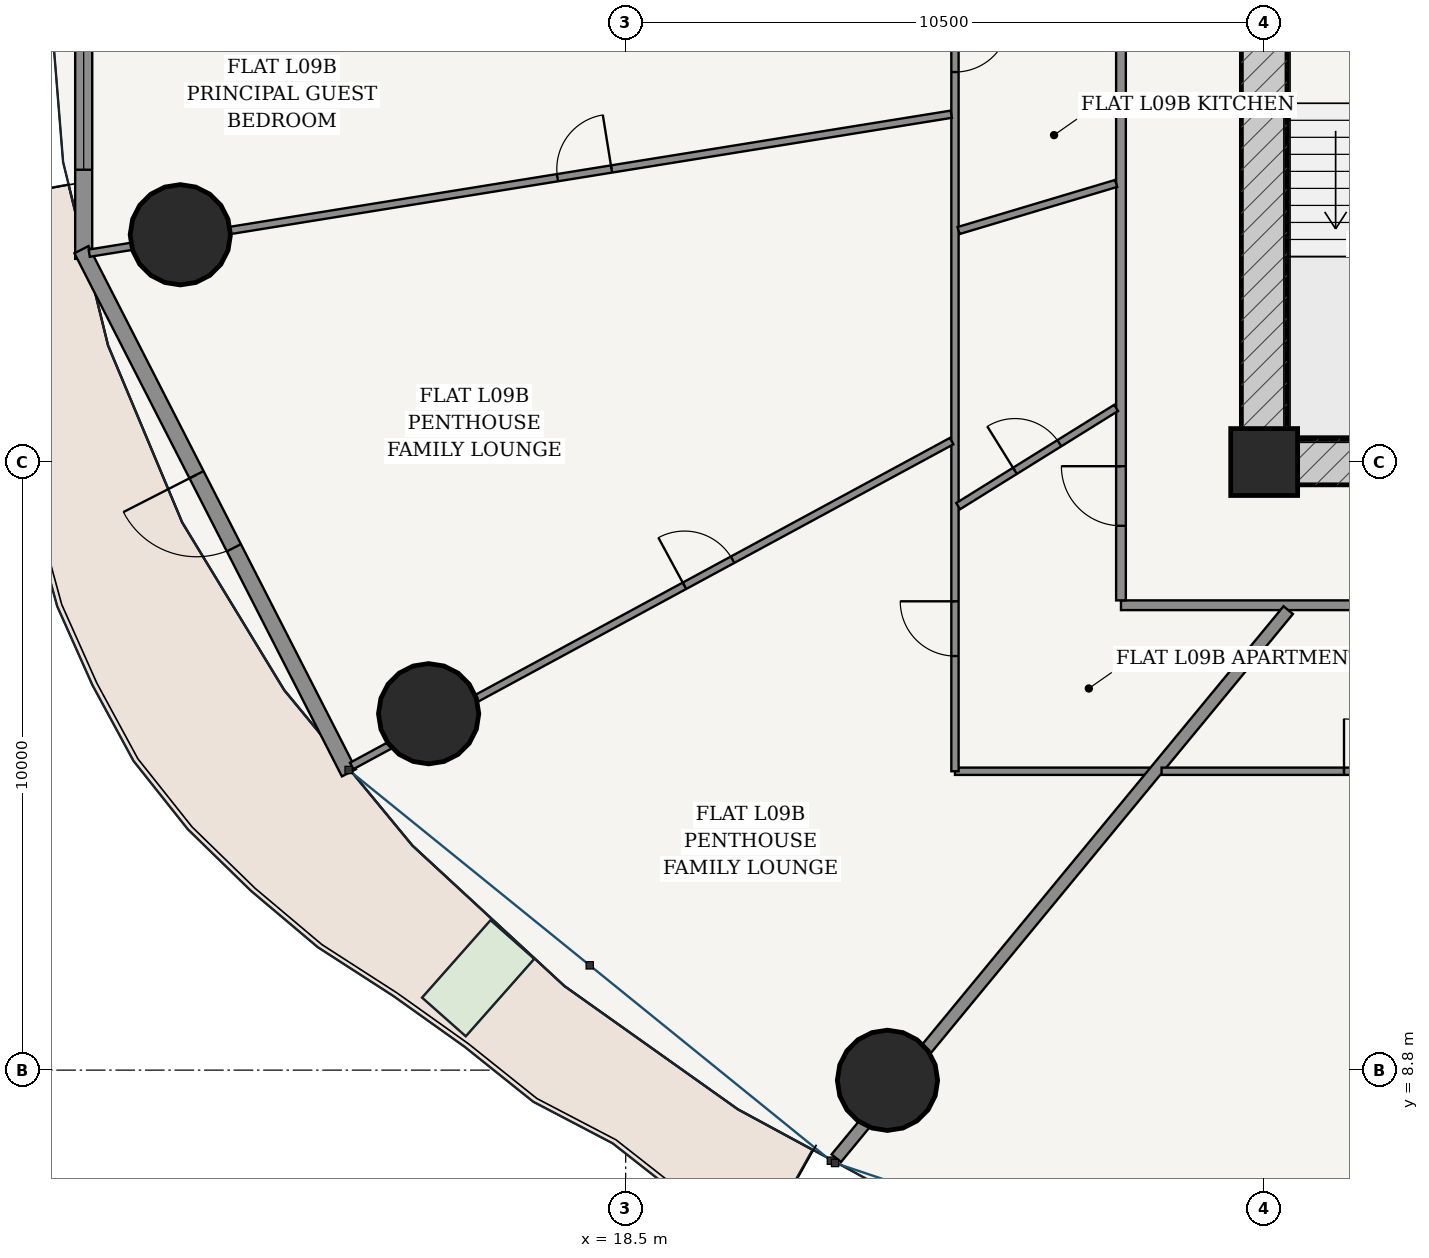
"""IFC4 building model, lengths in metres.
Left out: names, types, materials, properties, quantities, classifications, styles, units other than length and angle.
Written with IfcOpenShell. Run it as: python <this file> out.ifc"""

import sys

from ifc_helpers import new_model, si_unit, direction, frame, frame_2d, origin, origin_2d, place, context, subcontext, project, spatial, rectangle, hollow_circle, extrude, source, transform, mapped, element, fill, save


model = new_model("IFC4")
c1 = context("Model", 3, precision=1e-05, world=origin(), true_north=direction((-0.2419218956, 0.970295726276)))
c2 = subcontext(c1, "Body", "Model", "MODEL_VIEW")
j1 = project(units=[si_unit("LENGTHUNIT", "METRE"), si_unit("PLANEANGLEUNIT", "RADIAN")], contexts=[c1])
p1 = place(None, origin())
s1 = spatial("IfcSite", under=j1, at=p1, CompositionType="ELEMENT")
p2 = place(p1, origin())
s2 = spatial("IfcBuilding", under=s1, at=p2, CompositionType="ELEMENT")
p3 = place(p2, frame((0.0, 0.0, 38.4)))
s3 = spatial("IfcBuildingStorey", under=s2, at=p3, CompositionType="ELEMENT", Elevation=38.4)
p4 = place(p3, frame((29.0, 18.8, 0.0), z_axis=(0.0, 0.0, 1.0), x_axis=(1.0, 0.0, 0.0)))
e1 = element("IfcColumn", 1, at=p4, inside=s3, PredefinedType="COLUMN", context=c2, shape_type="SweptSolid", body=[
    extrude(rectangle(XDim=1.1, YDim=1.1, at=origin_2d()), origin(), (0.0, 0.0, 1.0), 3.6),
])
p5 = place(p3, frame((28.625, 18.8, 0.0), z_axis=(0.0, 0.0, 1.0), x_axis=(1.0, 0.0, 0.0)))
e2 = element("IfcWall", 2, at=p5, inside=s3, PredefinedType="SHEAR", context=c2, shape_type="SweptSolid", body=[
    extrude(rectangle(XDim=18.75, YDim=0.75, at=frame_2d((9.375, 0.0))), origin(), (0.0, 0.0, 1.0), 3.32),
])
p6 = place(p5, frame((6.927, 0.0, 0.0)))
e3 = element("IfcOpeningElement", 3, at=p6, cuts=e2, PredefinedType="OPENING", context=c2, shape_type="SweptSolid", body=[
    extrude(rectangle(XDim=0.85, YDim=2.1, at=frame_2d((0.425, 1.05))), frame((0.0, 0.385, 0.0), z_axis=(0.0, -1.0, 0.0), x_axis=(1.0, 0.0, 0.0)), (0.0, 0.0, 1.0), 0.77),
])
p7 = place(p5, frame((8.95, 0.0, 0.0)))
e4 = element("IfcOpeningElement", 4, at=p7, cuts=e2, PredefinedType="OPENING", context=c2, shape_type="SweptSolid", body=[
    extrude(rectangle(XDim=0.85, YDim=2.1, at=frame_2d((0.425, 1.05))), frame((0.0, 0.385, 0.0), z_axis=(0.0, -1.0, 0.0), x_axis=(1.0, 0.0, 0.0)), (0.0, 0.0, 1.0), 0.77),
])
p8 = place(p5, frame((10.972, 0.0, 0.0)))
e5 = element("IfcOpeningElement", 5, at=p8, cuts=e2, PredefinedType="OPENING", context=c2, shape_type="SweptSolid", body=[
    extrude(rectangle(XDim=0.85, YDim=2.1, at=frame_2d((0.425, 1.05))), frame((0.0, 0.385, 0.0), z_axis=(0.0, -1.0, 0.0), x_axis=(1.0, 0.0, 0.0)), (0.0, 0.0, 1.0), 0.77),
])
p9 = place(p3, frame((29.0, 19.175, 0.0), z_axis=(0.0, 0.0, 1.0), x_axis=(0.0, 1.0, 0.0)))
e6 = element("IfcWall", 6, at=p9, inside=s3, PredefinedType="SHEAR", context=c2, shape_type="SweptSolid", body=[
    extrude(rectangle(XDim=15.25, YDim=0.75, at=frame_2d((7.625, 0.0))), origin(), (0.0, 0.0, 1.0), 3.32),
])
p10 = place(p9, frame((9.875, 0.0, 0.0)))
e7 = element("IfcOpeningElement", 7, at=p10, cuts=e6, PredefinedType="OPENING", context=c2, shape_type="SweptSolid", body=[
    extrude(rectangle(XDim=1.5, YDim=2.2, at=frame_2d((0.75, 1.1))), frame((0.0, 0.385, 0.0), z_axis=(0.0, -1.0, 0.0), x_axis=(1.0, 0.0, 0.0)), (0.0, 0.0, 1.0), 0.77),
])
for number, where, z_axis, x_axis in (
    (8, (11.176, 22.537, 0.0), (0.0, 0.0, 1.0), (1.0, 0.0, 0.0)),
    (9, (15.259, 14.661, 0.0), (0.0, 0.0, 1.0), (1.0, 0.0, 0.0)),
    (10, (22.805, 8.632, 0.0), (0.0, 0.0, 1.0), (1.0, 0.0, 0.0)),
):
    element("IfcColumn", number, at=place(p3, frame(where, z_axis=z_axis, x_axis=x_axis)), inside=s3, PredefinedType="COLUMN", context=c2, shape_type="SweptSolid", body=[
        extrude(hollow_circle(Radius=0.825, WallThickness=0.05, at=origin_2d()), origin(), (0.0, 0.0, 1.0), 3.6),
    ])
p11 = place(p3, frame((9.587, 31.459, 0.0), z_axis=(0.0, 0.0, 1.0), x_axis=(0.0, -1.0, 0.0)))
e11 = element("IfcWall", 11, at=p11, inside=s3, PredefinedType="SOLIDWALL", context=c2, shape_type="SweptSolid", body=[
    extrude(rectangle(XDim=9.318, YDim=0.28, at=frame_2d((4.659, 0.0))), origin(), (0.0, 0.0, 1.0), 3.32),
])
p12 = place(p11, frame((1.466, 0.0, 0.85)))
e12 = element("IfcOpeningElement", 12, at=p12, cuts=e11, PredefinedType="OPENING", context=c2, shape_type="SweptSolid", body=[
    extrude(rectangle(XDim=2.1, YDim=1.95, at=frame_2d((1.05, 0.975))), frame((0.0, 0.15, 0.0), z_axis=(0.0, -1.0, 0.0), x_axis=(1.0, 0.0, 0.0)), (0.0, 0.0, 1.0), 0.3),
])
p13 = place(p11, frame((5.752, 0.0, 0.85)))
e13 = element("IfcOpeningElement", 13, at=p13, cuts=e11, PredefinedType="OPENING", context=c2, shape_type="SweptSolid", body=[
    extrude(rectangle(XDim=2.1, YDim=1.95, at=frame_2d((1.05, 0.975))), frame((0.0, 0.15, 0.0), z_axis=(0.0, -1.0, 0.0), x_axis=(1.0, 0.0, 0.0)), (0.0, 0.0, 1.0), 0.3),
])
p14 = place(p3, frame((9.55, 22.292, 0.0), z_axis=(0.0, 0.0, 1.0), x_axis=(0.455220575541, -0.890378698984, 0.0)))
e14 = element("IfcWall", 14, at=p14, inside=s3, PredefinedType="SOLIDWALL", context=c2, shape_type="SweptSolid", body=[
    extrude(rectangle(XDim=9.662, YDim=0.26, at=frame_2d((4.831, 0.0))), origin(), (0.0, 0.0, 1.0), 3.32),
])
p15 = place(p14, frame((4.156, 0.0, 0.0)))
e15 = element("IfcOpeningElement", 15, at=p15, cuts=e14, PredefinedType="OPENING", context=c2, shape_type="SweptSolid", body=[
    extrude(rectangle(XDim=1.35, YDim=2.2, at=frame_2d((0.675, 1.1))), frame((0.0, 0.14, 0.0), z_axis=(0.0, -1.0, 0.0), x_axis=(1.0, 0.0, 0.0)), (0.0, 0.0, 1.0), 0.28),
])
p16 = place(p3, frame((26.645, 16.445, 0.0), z_axis=(0.0, 0.0, 1.0), x_axis=(1.0, 0.0, 0.0)))
e16 = element("IfcWall", 16, at=p16, inside=s3, PredefinedType="PARTITIONING", context=c2, shape_type="SweptSolid", body=[
    extrude(rectangle(XDim=22.71, YDim=0.16, at=frame_2d((11.355, 0.0))), origin(), (0.0, 0.0, 1.0), 2.688),
])
p17 = place(p3, frame((26.645, 16.525, 0.0), z_axis=(0.0, 0.0, 1.0), x_axis=(0.0, 1.0, 0.0)))
e17 = element("IfcWall", 17, at=p17, inside=s3, PredefinedType="PARTITIONING", context=c2, shape_type="SweptSolid", body=[
    extrude(rectangle(XDim=20.55, YDim=0.16, at=frame_2d((10.275, 0.0))), origin(), (0.0, 0.0, 1.0), 2.688),
])
p18 = place(p17, frame((1.226, 0.0, 0.0)))
e18 = element("IfcOpeningElement", 18, at=p18, cuts=e17, PredefinedType="OPENING", context=c2, shape_type="SweptSolid", body=[
    extrude(rectangle(XDim=0.98, YDim=2.2, at=frame_2d((0.49, 1.1))), frame((0.0, 0.09, 0.0), z_axis=(0.0, -1.0, 0.0), x_axis=(1.0, 0.0, 0.0)), (0.0, 0.0, 1.0), 0.18),
])
p19 = place(p3, frame((27.109, 13.715, 0.0), z_axis=(0.0, 0.0, 1.0), x_axis=(-1.0, 0.0, 0.0)))
e19 = element("IfcWall", 19, at=p19, inside=s3, PredefinedType="PARTITIONING", context=c2, shape_type="SweptSolid", body=[
    extrude(rectangle(XDim=3.194, YDim=0.12, at=frame_2d((1.597, 0.0))), origin(), (0.0, 0.0, 1.0), 2.688),
])
p20 = place(p3, frame((23.915, 13.715, 0.0), z_axis=(0.0, 0.0, 1.0), x_axis=(0.0, 1.0, 0.0)))
e20 = element("IfcWall", 20, at=p20, inside=s3, PredefinedType="PARTITIONING", context=c2, shape_type="SweptSolid", body=[
    extrude(rectangle(XDim=26.17, YDim=0.12, at=frame_2d((13.085, 0.0))), origin(), (0.0, 0.0, 1.0), 2.688),
])
p21 = place(p20, frame((1.895, 0.0, 0.0)))
e21 = element("IfcOpeningElement", 21, at=p21, cuts=e20, PredefinedType="OPENING", context=c2, shape_type="SweptSolid", body=[
    extrude(rectangle(XDim=0.9, YDim=2.15, at=frame_2d((0.45, 1.075))), frame((0.0, 0.07, 0.0), z_axis=(0.0, -1.0, 0.0), x_axis=(1.0, 0.0, 0.0)), (0.0, 0.0, 1.0), 0.14),
])
p22 = place(p20, frame((11.498, 0.0, 0.0)))
e22 = element("IfcOpeningElement", 22, at=p22, cuts=e20, PredefinedType="OPENING", context=c2, shape_type="SweptSolid", body=[
    extrude(rectangle(XDim=0.9, YDim=2.15, at=frame_2d((0.45, 1.075))), frame((0.0, 0.07, 0.0), z_axis=(0.0, -1.0, 0.0), x_axis=(1.0, 0.0, 0.0)), (0.0, 0.0, 1.0), 0.14),
])
p23 = place(p20, frame((23.831, 0.0, 0.0)))
e23 = element("IfcOpeningElement", 23, at=p23, cuts=e20, PredefinedType="OPENING", context=c2, shape_type="SweptSolid", body=[
    extrude(rectangle(XDim=0.86, YDim=2.15, at=frame_2d((0.43, 1.075))), frame((0.0, 0.07, 0.0), z_axis=(0.0, -1.0, 0.0), x_axis=(1.0, 0.0, 0.0)), (0.0, 0.0, 1.0), 0.14),
])
p24 = place(p3, frame((23.854, 24.52, 0.0), z_axis=(0.0, 0.0, 1.0), x_axis=(-0.987258444847, -0.159124991997, 0.0)))
e24 = element("IfcWall", 24, at=p24, inside=s3, PredefinedType="PARTITIONING", context=c2, shape_type="SweptSolid", body=[
    extrude(rectangle(XDim=14.359, YDim=0.12, at=frame_2d((7.18, 0.0))), origin(), (0.0, 0.0, 1.0), 2.688),
])
p25 = place(p24, frame((5.659, 0.0, 0.0)))
e25 = element("IfcOpeningElement", 25, at=p25, cuts=e24, PredefinedType="OPENING", context=c2, shape_type="SweptSolid", body=[
    extrude(rectangle(XDim=0.9, YDim=2.15, at=frame_2d((0.45, 1.075))), frame((0.0, 0.07, 0.0), z_axis=(0.0, -1.0, 0.0), x_axis=(1.0, 0.0, 0.0)), (0.0, 0.0, 1.0), 0.14),
])
p26 = place(p3, frame((23.861, 19.144, 0.0), z_axis=(0.0, 0.0, 1.0), x_axis=(-0.879372452045, -0.476134529922, 0.0)))
e26 = element("IfcWall", 26, at=p26, inside=s3, PredefinedType="PARTITIONING", context=c2, shape_type="SweptSolid", body=[
    extrude(rectangle(XDim=11.219, YDim=0.12, at=frame_2d((5.61, 0.0))), origin(), (0.0, 0.0, 1.0), 2.688),
])
p27 = place(p26, frame((4.097, 0.0, 0.0)))
e27 = element("IfcOpeningElement", 27, at=p27, cuts=e26, PredefinedType="OPENING", context=c2, shape_type="SweptSolid", body=[
    extrude(rectangle(XDim=0.9, YDim=2.15, at=frame_2d((0.45, 1.075))), frame((0.0, 0.07, 0.0), z_axis=(0.0, -1.0, 0.0), x_axis=(1.0, 0.0, 0.0)), (0.0, 0.0, 1.0), 0.14),
])
p28 = place(p3, frame((26.565, 23.382, 0.0), z_axis=(0.0, 0.0, 1.0), x_axis=(-0.958081868855, -0.286494559408, 0.0)))
e28 = element("IfcWall", 28, at=p28, inside=s3, PredefinedType="PARTITIONING", context=c2, shape_type="SweptSolid", body=[
    extrude(rectangle(XDim=2.704, YDim=0.12, at=frame_2d((1.352, 0.0))), origin(), (0.0, 0.0, 1.0), 3.32),
])
p29 = place(p3, frame((26.565, 19.69, 0.0), z_axis=(0.0, 0.0, 1.0), x_axis=(-0.849229217796, -0.52802437031, 0.0)))
e29 = element("IfcWall", 29, at=p29, inside=s3, PredefinedType="PARTITIONING", context=c2, shape_type="SweptSolid", body=[
    extrude(rectangle(XDim=3.059, YDim=0.12, at=frame_2d((1.529, 0.0))), origin(), (0.0, 0.0, 1.0), 3.32),
])
p30 = place(p29, frame((1.099, 0.0, 0.0)))
e30 = element("IfcOpeningElement", 30, at=p30, cuts=e29, PredefinedType="OPENING", context=c2, shape_type="SweptSolid", body=[
    extrude(rectangle(XDim=0.86, YDim=2.15, at=frame_2d((0.43, 1.075))), frame((0.0, 0.07, 0.0), z_axis=(0.0, -1.0, 0.0), x_axis=(1.0, 0.0, 0.0)), (0.0, 0.0, 1.0), 0.14),
])
p31 = place(p3, frame((29.396, 16.365, 0.0), z_axis=(0.0, 0.0, 1.0), x_axis=(-0.636186165667, -0.771535587393, 0.0)))
e31 = element("IfcWall", 31, at=p31, inside=s3, PredefinedType="PARTITIONING", context=c2, shape_type="SweptSolid", body=[
    extrude(rectangle(XDim=11.683, YDim=0.2, at=frame_2d((5.842, 0.0))), origin(), (0.0, 0.0, 1.0), 2.688),
])
p32 = place(p3, frame((52.085, 13.715, 0.0), z_axis=(0.0, 0.0, 1.0), x_axis=(-1.0, 0.0, 0.0)))
e32 = element("IfcWall", 32, at=p32, inside=s3, PredefinedType="PARTITIONING", context=c2, shape_type="SweptSolid", body=[
    extrude(rectangle(XDim=24.772, YDim=0.12, at=frame_2d((12.386, 0.0))), origin(), (0.0, 0.0, 1.0), 2.688),
])
p33 = place(p32, frame((20.912, 0.0, 0.0)))
e33 = element("IfcOpeningElement", 33, at=p33, cuts=e32, PredefinedType="OPENING", context=c2, shape_type="SweptSolid", body=[
    extrude(rectangle(XDim=0.86, YDim=2.15, at=frame_2d((0.43, 1.075))), frame((0.0, 0.07, 0.0), z_axis=(0.0, -1.0, 0.0), x_axis=(1.0, 0.0, 0.0)), (0.0, 0.0, 1.0), 0.14),
])
p34 = place(p32, frame((13.87, 0.0, 0.0)))
e34 = element("IfcOpeningElement", 34, at=p34, cuts=e32, PredefinedType="OPENING", context=c2, shape_type="SweptSolid", body=[
    extrude(rectangle(XDim=0.9, YDim=2.15, at=frame_2d((0.45, 1.075))), frame((0.0, 0.07, 0.0), z_axis=(0.0, -1.0, 0.0), x_axis=(1.0, 0.0, 0.0)), (0.0, 0.0, 1.0), 0.14),
])
m1 = source(origin(), c2, "Body", "SweptSolid", [
    extrude(rectangle(XDim=2.1, YDim=1.95, at=frame_2d((1.05, 0.975))), frame((0.0, 0.03, 0.0), z_axis=(0.0, -1.0, 0.0), x_axis=(1.0, 0.0, 0.0)), (0.0, 0.0, 1.0), 0.06),
])
p35 = place(p13, origin())
e35 = element("IfcWindow", 35, at=p35, inside=s3, PartitioningType="SINGLE_PANEL", PredefinedType="WINDOW", context=c2, shape_type="MappedRepresentation", body=[
    mapped(m1, transform((0.0, 0.0, 0.0), scale=1.0)),
])
fill(e13, e35)
m2 = source(origin(), c2, "Body", "SweptSolid", [
    extrude(rectangle(XDim=1.35, YDim=2.2, at=frame_2d((0.675, 1.1))), frame((0.0, 0.025, 0.0), z_axis=(0.0, -1.0, 0.0), x_axis=(1.0, 0.0, 0.0)), (0.0, 0.0, 1.0), 0.05),
])
p36 = place(p15, frame((1.35, 0.0, 0.0), z_axis=(0.0, 0.0, 1.0), x_axis=(-1.0, 0.0, 0.0)))
e36 = element("IfcDoor", 36, at=p36, inside=s3, OperationType="SINGLE_SWING_RIGHT", PredefinedType="DOOR", context=c2, shape_type="MappedRepresentation", body=[
    mapped(m2, transform((0.0, 0.0, 0.0), scale=1.0)),
])
fill(e15, e36)
m3 = source(origin(), c2, "Body", "SweptSolid", [
    extrude(rectangle(XDim=0.98, YDim=2.2, at=frame_2d((0.49, 1.1))), frame((0.0, 0.025, 0.0), z_axis=(0.0, -1.0, 0.0), x_axis=(1.0, 0.0, 0.0)), (0.0, 0.0, 1.0), 0.05),
])
p37 = place(p18, origin())
e37 = element("IfcDoor", 37, at=p37, inside=s3, OperationType="SINGLE_SWING_RIGHT", PredefinedType="DOOR", context=c2, shape_type="MappedRepresentation", body=[
    mapped(m3, transform((0.0, 0.0, 0.0), scale=1.0)),
])
fill(e18, e37)
m4 = source(origin(), c2, "Body", "SweptSolid", [
    extrude(rectangle(XDim=0.86, YDim=2.15, at=frame_2d((0.43, 1.075))), frame((0.0, 0.025, 0.0), z_axis=(0.0, -1.0, 0.0), x_axis=(1.0, 0.0, 0.0)), (0.0, 0.0, 1.0), 0.05),
])
p38 = place(p30, frame((0.86, 0.0, 0.0), z_axis=(0.0, 0.0, 1.0), x_axis=(-1.0, 0.0, 0.0)))
e38 = element("IfcDoor", 38, at=p38, inside=s3, OperationType="SINGLE_SWING_LEFT", PredefinedType="DOOR", context=c2, shape_type="MappedRepresentation", body=[
    mapped(m4, transform((0.0, 0.0, 0.0), scale=1.0)),
])
fill(e30, e38)
m5 = source(origin(), c2, "Body", "SweptSolid", [
    extrude(rectangle(XDim=0.9, YDim=2.15, at=frame_2d((0.45, 1.075))), frame((0.0, 0.025, 0.0), z_axis=(0.0, -1.0, 0.0), x_axis=(1.0, 0.0, 0.0)), (0.0, 0.0, 1.0), 0.05),
])
p39 = place(p21, origin())
e39 = element("IfcDoor", 39, at=p39, inside=s3, OperationType="SINGLE_SWING_RIGHT", PredefinedType="DOOR", context=c2, shape_type="MappedRepresentation", body=[
    mapped(m5, transform((0.0, 0.0, 0.0), scale=1.0)),
])
fill(e21, e39)
p40 = place(p27, frame((0.9, 0.0, 0.0), z_axis=(0.0, 0.0, 1.0), x_axis=(-1.0, 0.0, 0.0)))
e40 = element("IfcDoor", 40, at=p40, inside=s3, OperationType="SINGLE_SWING_LEFT", PredefinedType="DOOR", context=c2, shape_type="MappedRepresentation", body=[
    mapped(m5, transform((0.0, 0.0, 0.0), scale=1.0)),
])
fill(e27, e40)
p41 = place(p25, frame((0.9, 0.0, 0.0), z_axis=(0.0, 0.0, 1.0), x_axis=(-1.0, 0.0, 0.0)))
e41 = element("IfcDoor", 41, at=p41, inside=s3, OperationType="SINGLE_SWING_RIGHT", PredefinedType="DOOR", context=c2, shape_type="MappedRepresentation", body=[
    mapped(m5, transform((0.0, 0.0, 0.0), scale=1.0)),
])
fill(e25, e41)
p42 = place(p22, frame((0.9, 0.0, 0.0), z_axis=(0.0, 0.0, 1.0), x_axis=(-1.0, 0.0, 0.0)))
e42 = element("IfcDoor", 42, at=p42, inside=s3, OperationType="SINGLE_SWING_LEFT", PredefinedType="DOOR", context=c2, shape_type="MappedRepresentation", body=[
    mapped(m5, transform((0.0, 0.0, 0.0), scale=1.0)),
])
fill(e22, e42)
p43 = place(p33, frame((0.86, 0.0, 0.0), z_axis=(0.0, 0.0, 1.0), x_axis=(-1.0, 0.0, 0.0)))
e43 = element("IfcDoor", 43, at=p43, inside=s3, OperationType="SINGLE_SWING_LEFT", PredefinedType="DOOR", context=c2, shape_type="MappedRepresentation", body=[
    mapped(m4, transform((0.0, 0.0, 0.0), scale=1.0)),
])
fill(e33, e43)
save(model, sys.argv[1])
